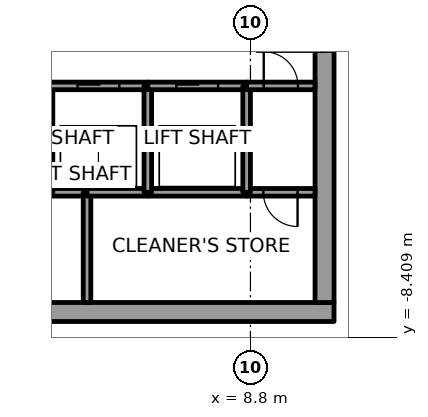
"""IFC4 building model, lengths in metres.
Left out: names, types, materials, properties, quantities, classifications, styles, units other than length and angle.
Written with IfcOpenShell. Run it as: python <this file> out.ifc"""

import sys

from ifc_helpers import new_model, si_unit, direction, frame, frame_2d, origin, place, context, subcontext, project, spatial, rectangle, extrude, element, fill, save


model = new_model("IFC4")
c1 = context("Model", 3, precision=1e-05, world=origin(), true_north=direction((0.0, 1.0)))
c2 = subcontext(c1, "Body", "Model", "MODEL_VIEW")
j1 = project(units=[si_unit("LENGTHUNIT", "METRE"), si_unit("PLANEANGLEUNIT", "RADIAN")], contexts=[c1])
p1 = place(None, origin())
s1 = spatial("IfcSite", under=j1, at=p1, CompositionType="ELEMENT")
p2 = place(p1, origin())
s2 = spatial("IfcBuilding", under=s1, at=p2, CompositionType="ELEMENT")
p3 = place(p2, frame((0.0, 0.0, 129.8)))
s3 = spatial("IfcBuildingStorey", under=s2, at=p3, CompositionType="ELEMENT", Elevation=129.8)
p4 = place(p3, frame((-11.0, -7.75, 0.0), z_axis=(0.0, 0.0, 1.0), x_axis=(1.0, 0.0, 0.0)))
e1 = element("IfcWall", 1, at=p4, inside=s3, PredefinedType="SHEAR", context=c2, shape_type="SweptSolid", body=[
    extrude(rectangle(XDim=22.0, YDim=0.5, at=frame_2d((11.0, 0.0))), origin(), (0.0, 0.0, 1.0), 4.0),
])
p5 = place(p4, frame((10.45, 0.0, 0.0)))
e2 = element("IfcOpeningElement", 2, at=p5, cuts=e1, PredefinedType="OPENING", context=c2, shape_type="SweptSolid", body=[
    extrude(rectangle(XDim=1.1, YDim=2.1, at=frame_2d((0.55, 1.05))), frame((0.0, 0.25, 0.0), z_axis=(0.0, -1.0, 0.0), x_axis=(1.0, 0.0, 0.0)), (0.0, 0.0, 1.0), 0.5),
])
p6 = place(p3, frame((10.75, -7.5, 0.0), z_axis=(0.0, 0.0, 1.0), x_axis=(0.0, 1.0, 0.0)))
e3 = element("IfcWall", 3, at=p6, inside=s3, PredefinedType="SHEAR", context=c2, shape_type="SweptSolid", body=[
    extrude(rectangle(XDim=15.0, YDim=0.5, at=frame_2d((7.5, 0.0))), origin(), (0.0, 0.0, 1.0), 4.0),
])
p7 = place(p6, frame((6.6, 0.0, 0.0)))
e4 = element("IfcOpeningElement", 4, at=p7, cuts=e3, PredefinedType="OPENING", context=c2, shape_type="SweptSolid", body=[
    extrude(rectangle(XDim=1.8, YDim=2.1, at=frame_2d((0.9, 1.05))), frame((0.0, 0.25, 0.0), z_axis=(0.0, -1.0, 0.0), x_axis=(1.0, 0.0, 0.0)), (0.0, 0.0, 1.0), 0.5),
])
p8 = place(p3, frame((4.5, -4.6, 0.0), z_axis=(0.0, 0.0, 1.0), x_axis=(-1.0, 0.0, 0.0)))
e5 = element("IfcWall", 5, at=p8, inside=s3, PredefinedType="SOLIDWALL", context=c2, shape_type="SweptSolid", body=[
    extrude(rectangle(XDim=1.0, YDim=0.2, at=frame_2d((0.5, 0.0))), origin(), (0.0, 0.0, 1.0), 3.85),
])
p9 = place(p3, frame((3.5, -1.8, 0.0), z_axis=(0.0, 0.0, 1.0), x_axis=(1.0, 0.0, 0.0)))
e6 = element("IfcWall", 6, at=p9, inside=s3, PredefinedType="SOLIDWALL", context=c2, shape_type="SweptSolid", body=[
    extrude(rectangle(XDim=2.6, YDim=0.2, at=frame_2d((1.3, 0.0))), origin(), (0.0, 0.0, 1.0), 3.85),
])
p10 = place(p9, frame((0.75, 0.0, 0.0)))
e7 = element("IfcOpeningElement", 7, at=p10, cuts=e6, PredefinedType="OPENING", context=c2, shape_type="SweptSolid", body=[
    extrude(rectangle(XDim=1.1, YDim=2.1, at=frame_2d((0.55, 1.05))), frame((0.0, 0.1, 0.0), z_axis=(0.0, -1.0, 0.0), x_axis=(1.0, 0.0, 0.0)), (0.0, 0.0, 1.0), 0.2),
])
p11 = place(p3, frame((4.5, -4.6, 0.0), z_axis=(0.0, 0.0, 1.0), x_axis=(0.0, -1.0, 0.0)))
e8 = element("IfcWall", 8, at=p11, inside=s3, PredefinedType="SOLIDWALL", context=c2, shape_type="SweptSolid", body=[
    extrude(rectangle(XDim=2.9, YDim=0.2, at=frame_2d((1.45, 0.0))), origin(), (0.0, 0.0, 1.0), 3.85),
])
p12 = place(p3, frame((6.1, -4.6, 0.0), z_axis=(0.0, 0.0, 1.0), x_axis=(-1.0, 0.0, 0.0)))
e9 = element("IfcWall", 9, at=p12, inside=s3, PredefinedType="SOLIDWALL", context=c2, shape_type="SweptSolid", body=[
    extrude(rectangle(XDim=1.6, YDim=0.2, at=frame_2d((0.8, 0.0))), origin(), (0.0, 0.0, 1.0), 3.85),
])
p13 = place(p3, frame((8.7, -4.6, 0.0), z_axis=(0.0, 0.0, 1.0), x_axis=(-1.0, 0.0, 0.0)))
e10 = element("IfcWall", 10, at=p13, inside=s3, PredefinedType="SOLIDWALL", context=c2, shape_type="SweptSolid", body=[
    extrude(rectangle(XDim=2.6, YDim=0.2, at=frame_2d((1.3, 0.0))), origin(), (0.0, 0.0, 1.0), 3.85),
])
p14 = place(p3, frame((6.1, -4.6, 0.0), z_axis=(0.0, 0.0, 1.0), x_axis=(0.0, 1.0, 0.0)))
e11 = element("IfcWall", 11, at=p14, inside=s3, PredefinedType="SOLIDWALL", context=c2, shape_type="SweptSolid", body=[
    extrude(rectangle(XDim=2.8, YDim=0.2, at=frame_2d((1.4, 0.0))), origin(), (0.0, 0.0, 1.0), 3.85),
])
p15 = place(p3, frame((6.1, -1.8, 0.0), z_axis=(0.0, 0.0, 1.0), x_axis=(1.0, 0.0, 0.0)))
e12 = element("IfcWall", 12, at=p15, inside=s3, PredefinedType="SOLIDWALL", context=c2, shape_type="SweptSolid", body=[
    extrude(rectangle(XDim=2.6, YDim=0.2, at=frame_2d((1.3, 0.0))), origin(), (0.0, 0.0, 1.0), 3.85),
])
p16 = place(p15, frame((0.75, 0.0, 0.0)))
e13 = element("IfcOpeningElement", 13, at=p16, cuts=e12, PredefinedType="OPENING", context=c2, shape_type="SweptSolid", body=[
    extrude(rectangle(XDim=1.1, YDim=2.1, at=frame_2d((0.55, 1.05))), frame((0.0, 0.1, 0.0), z_axis=(0.0, -1.0, 0.0), x_axis=(1.0, 0.0, 0.0)), (0.0, 0.0, 1.0), 0.2),
])
p17 = place(p3, frame((10.5, -4.6, 0.0), z_axis=(0.0, 0.0, 1.0), x_axis=(-1.0, 0.0, 0.0)))
e14 = element("IfcWall", 14, at=p17, inside=s3, PredefinedType="SOLIDWALL", context=c2, shape_type="SweptSolid", body=[
    extrude(rectangle(XDim=1.8, YDim=0.2, at=frame_2d((0.9, 0.0))), origin(), (0.0, 0.0, 1.0), 3.85),
])
p18 = place(p17, frame((0.46, 0.0, 0.0)))
e15 = element("IfcOpeningElement", 15, at=p18, cuts=e14, PredefinedType="OPENING", context=c2, shape_type="SweptSolid", body=[
    extrude(rectangle(XDim=0.9, YDim=2.1, at=frame_2d((0.45, 1.05))), frame((0.0, 0.1, 0.0), z_axis=(0.0, -1.0, 0.0), x_axis=(1.0, 0.0, 0.0)), (0.0, 0.0, 1.0), 0.2),
])
p19 = place(p3, frame((8.7, -1.8, 0.0), z_axis=(0.0, 0.0, 1.0), x_axis=(0.0, -1.0, 0.0)))
e16 = element("IfcWall", 16, at=p19, inside=s3, PredefinedType="SOLIDWALL", context=c2, shape_type="SweptSolid", body=[
    extrude(rectangle(XDim=2.8, YDim=0.2, at=frame_2d((1.4, 0.0))), origin(), (0.0, 0.0, 1.0), 3.85),
])
p20 = place(p3, frame((8.7, -1.8, 0.0), z_axis=(0.0, 0.0, 1.0), x_axis=(1.0, 0.0, 0.0)))
e17 = element("IfcWall", 17, at=p20, inside=s3, PredefinedType="SOLIDWALL", context=c2, shape_type="SweptSolid", body=[
    extrude(rectangle(XDim=1.8, YDim=0.2, at=frame_2d((0.9, 0.0))), origin(), (0.0, 0.0, 1.0), 3.85),
])
p21 = place(p20, frame((0.45, 0.0, 0.0)))
e18 = element("IfcOpeningElement", 18, at=p21, cuts=e17, PredefinedType="OPENING", context=c2, shape_type="SweptSolid", body=[
    extrude(rectangle(XDim=0.9, YDim=2.1, at=frame_2d((0.45, 1.05))), frame((0.0, 0.1, 0.0), z_axis=(0.0, -1.0, 0.0), x_axis=(1.0, 0.0, 0.0)), (0.0, 0.0, 1.0), 0.2),
])
p22 = place(p10, origin())
e19 = element("IfcDoor", 19, at=p22, inside=s3, OperationType="SLIDING_TO_LEFT", PredefinedType="DOOR", context=c2, shape_type="SweptSolid", body=[
    extrude(rectangle(XDim=1.1, YDim=2.1, at=frame_2d((0.55, 1.05))), frame((0.0, 0.025, 0.0), z_axis=(0.0, -1.0, 0.0), x_axis=(1.0, 0.0, 0.0)), (0.0, 0.0, 1.0), 0.05),
])
fill(e7, e19)
p23 = place(p16, origin())
e20 = element("IfcDoor", 20, at=p23, inside=s3, OperationType="SLIDING_TO_LEFT", PredefinedType="DOOR", context=c2, shape_type="SweptSolid", body=[
    extrude(rectangle(XDim=1.1, YDim=2.1, at=frame_2d((0.55, 1.05))), frame((0.0, 0.025, 0.0), z_axis=(0.0, -1.0, 0.0), x_axis=(1.0, 0.0, 0.0)), (0.0, 0.0, 1.0), 0.05),
])
fill(e13, e20)
p24 = place(p18, origin())
e21 = element("IfcDoor", 21, at=p24, inside=s3, OperationType="SINGLE_SWING_LEFT", PredefinedType="DOOR", context=c2, shape_type="SweptSolid", body=[
    extrude(rectangle(XDim=0.9, YDim=2.1, at=frame_2d((0.45, 1.05))), frame((0.0, 0.025, 0.0), z_axis=(0.0, -1.0, 0.0), x_axis=(1.0, 0.0, 0.0)), (0.0, 0.0, 1.0), 0.05),
])
fill(e15, e21)
p25 = place(p21, origin())
e22 = element("IfcDoor", 22, at=p25, inside=s3, OperationType="SINGLE_SWING_RIGHT", PredefinedType="DOOR", context=c2, shape_type="SweptSolid", body=[
    extrude(rectangle(XDim=0.9, YDim=2.1, at=frame_2d((0.45, 1.05))), frame((0.0, 0.025, 0.0), z_axis=(0.0, -1.0, 0.0), x_axis=(1.0, 0.0, 0.0)), (0.0, 0.0, 1.0), 0.05),
])
fill(e18, e22)
p26 = place(p7, origin())
e23 = element("IfcDoor", 23, at=p26, inside=s3, OperationType="DOUBLE_DOOR_SINGLE_SWING", PredefinedType="DOOR", context=c2, shape_type="SweptSolid", body=[
    extrude(rectangle(XDim=1.8, YDim=2.1, at=frame_2d((0.9, 1.05))), frame((0.0, 0.025, 0.0), z_axis=(0.0, -1.0, 0.0), x_axis=(1.0, 0.0, 0.0)), (0.0, 0.0, 1.0), 0.05),
])
fill(e4, e23)
save(model, sys.argv[1])
